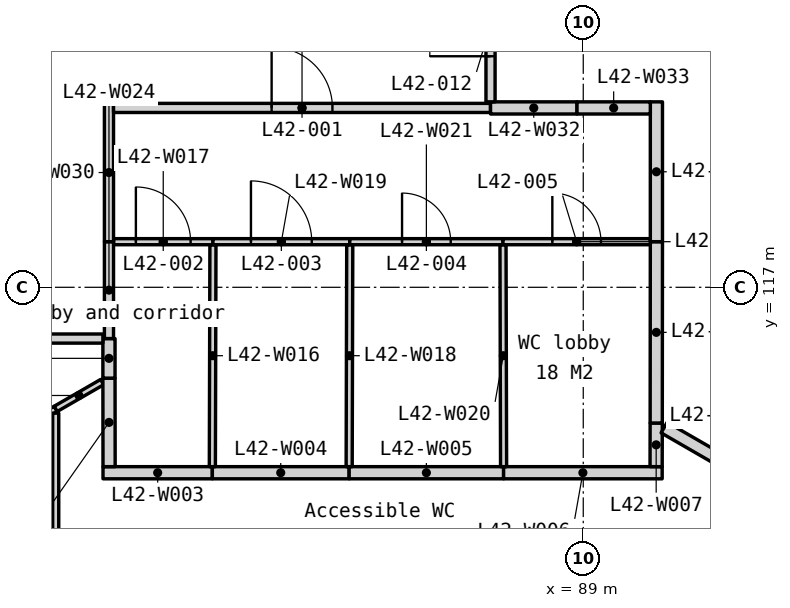
"""IFC4 building model, lengths in metres.
Left out: names, types, materials, properties, quantities, classifications, styles, units other than length and angle.
Written with IfcOpenShell. Run it as: python <this file> out.ifc"""

import sys

from ifc_helpers import new_model, si_unit, direction, frame, frame_2d, origin, place, context, subcontext, project, spatial, polyline, rectangle, outline, extrude, element, fill, save


model = new_model("IFC4")
c1 = context("Model", 3, precision=1e-05, world=origin(), true_north=direction((0.0, 1.0)))
c2 = subcontext(c1, "Body", "Model", "MODEL_VIEW")
j1 = project(units=[si_unit("LENGTHUNIT", "METRE"), si_unit("PLANEANGLEUNIT", "RADIAN")], contexts=[c1])
p1 = place(None, origin())
s1 = spatial("IfcSite", under=j1, at=p1, CompositionType="ELEMENT")
p2 = place(p1, origin())
s2 = spatial("IfcBuilding", under=s1, at=p2, CompositionType="ELEMENT")
p3 = place(p2, frame((0.0, 0.0, 167.6)))
s3 = spatial("IfcBuildingStorey", under=s2, at=p3, CompositionType="ELEMENT", Elevation=167.6)
p4 = place(p3, frame((88.166, 106.564, -0.15), z_axis=(0.0, 0.0, 1.0), x_axis=(0.499995644604, 0.866027918359, 0.0)))
e1 = element("IfcWall", 1, at=p4, inside=s3, PredefinedType="SOLIDWALL", context=c2, shape_type="SweptSolid", body=[
    extrude(outline(polyline([(28.365, 3.9), (28.365, 0.0), (0.0, 0.0), (0.0, 3.9), (28.365, 3.9)])), frame((0.0, 0.225, 0.0), z_axis=(0.0, -1.0, 0.0), x_axis=(1.0, 0.0, 0.0)), (0.0, 0.0, 1.0), 0.45),
])
p5 = place(p4, frame((6.072, 0.0, 0.95)))
e2 = element("IfcOpeningElement", 2, at=p5, cuts=e1, PredefinedType="OPENING", context=c2, shape_type="SweptSolid", body=[
    extrude(rectangle(XDim=1.8, YDim=2.2, at=frame_2d((0.9, 1.1))), frame((0.0, 0.235, 0.0), z_axis=(0.0, -1.0, 0.0), x_axis=(1.0, 0.0, 0.0)), (0.0, 0.0, 1.0), 0.47),
])
p6 = place(p4, frame((8.372, 0.0, 0.95)))
e3 = element("IfcOpeningElement", 3, at=p6, cuts=e1, PredefinedType="OPENING", context=c2, shape_type="SweptSolid", body=[
    extrude(rectangle(XDim=1.8, YDim=2.2, at=frame_2d((0.9, 1.1))), frame((0.0, 0.235, 0.0), z_axis=(0.0, -1.0, 0.0), x_axis=(1.0, 0.0, 0.0)), (0.0, 0.0, 1.0), 0.47),
])
p7 = place(p4, frame((16.193, 0.0, 0.95)))
e4 = element("IfcOpeningElement", 4, at=p7, cuts=e1, PredefinedType="OPENING", context=c2, shape_type="SweptSolid", body=[
    extrude(rectangle(XDim=1.8, YDim=2.2, at=frame_2d((0.9, 1.1))), frame((0.0, 0.235, 0.0), z_axis=(0.0, -1.0, 0.0), x_axis=(1.0, 0.0, 0.0)), (0.0, 0.0, 1.0), 0.47),
])
p8 = place(p4, frame((18.493, 0.0, 0.95)))
e5 = element("IfcOpeningElement", 5, at=p8, cuts=e1, PredefinedType="OPENING", context=c2, shape_type="SweptSolid", body=[
    extrude(rectangle(XDim=1.8, YDim=2.2, at=frame_2d((0.9, 1.1))), frame((0.0, 0.235, 0.0), z_axis=(0.0, -1.0, 0.0), x_axis=(1.0, 0.0, 0.0)), (0.0, 0.0, 1.0), 0.47),
])
p9 = place(p4, frame((26.295, 0.0, 0.95)))
e6 = element("IfcOpeningElement", 6, at=p9, cuts=e1, PredefinedType="OPENING", context=c2, shape_type="SweptSolid", body=[
    extrude(rectangle(XDim=1.2, YDim=2.2, at=frame_2d((0.6, 1.1))), frame((0.0, 0.235, 0.0), z_axis=(0.0, -1.0, 0.0), x_axis=(1.0, 0.0, 0.0)), (0.0, 0.0, 1.0), 0.47),
])
p10 = place(p3, frame((70.499, 109.328, 0.0), z_axis=(0.0, 0.0, 1.0), x_axis=(0.866029704776, 0.49999255039, 0.0)))
e7 = element("IfcWall", 7, at=p10, inside=s3, PredefinedType="PARTITIONING", context=c2, shape_type="SweptSolid", body=[
    extrude(rectangle(XDim=11.345, YDim=0.1, at=frame_2d((5.673, 0.0))), origin(), (0.0, 0.0, 1.0), 3.75),
])
p11 = place(p10, frame((5.223, 0.0, 0.0)))
e8 = element("IfcOpeningElement", 8, at=p11, cuts=e7, PredefinedType="OPENING", context=c2, shape_type="SweptSolid", body=[
    extrude(rectangle(XDim=0.9, YDim=2.1, at=frame_2d((0.45, 1.05))), frame((0.0, 0.06, 0.0), z_axis=(0.0, -1.0, 0.0), x_axis=(1.0, 0.0, 0.0)), (0.0, 0.0, 1.0), 0.12),
])
p12 = place(p3, frame((81.102, 113.95, 0.0), z_axis=(0.0, 0.0, 1.0), x_axis=(1.0, 0.0, 0.0)))
e9 = element("IfcWall", 9, at=p12, inside=s3, PredefinedType="PARTITIONING", context=c2, shape_type="SweptSolid", body=[
    extrude(rectangle(XDim=1.798, YDim=0.2, at=frame_2d((0.899, 0.0))), origin(), (0.0, 0.0, 1.0), 3.75),
])
p13 = place(p3, frame((82.9, 113.95, 0.0), z_axis=(0.0, 0.0, 1.0), x_axis=(1.0, 0.0, 0.0)))
e10 = element("IfcWall", 10, at=p13, inside=s3, PredefinedType="PARTITIONING", context=c2, shape_type="SweptSolid", body=[
    extrude(rectangle(XDim=2.25, YDim=0.2, at=frame_2d((1.125, 0.0))), origin(), (0.0, 0.0, 1.0), 3.75),
])
p14 = place(p3, frame((85.15, 113.95, 0.0), z_axis=(0.0, 0.0, 1.0), x_axis=(1.0, 0.0, 0.0)))
e11 = element("IfcWall", 11, at=p14, inside=s3, PredefinedType="PARTITIONING", context=c2, shape_type="SweptSolid", body=[
    extrude(rectangle(XDim=2.54, YDim=0.2, at=frame_2d((1.27, 0.0))), origin(), (0.0, 0.0, 1.0), 3.75),
])
p15 = place(p3, frame((87.69, 113.95, 0.0), z_axis=(0.0, 0.0, 1.0), x_axis=(1.0, 0.0, 0.0)))
e12 = element("IfcWall", 12, at=p15, inside=s3, PredefinedType="PARTITIONING", context=c2, shape_type="SweptSolid", body=[
    extrude(rectangle(XDim=2.608, YDim=0.2, at=frame_2d((1.304, 0.0))), origin(), (0.0, 0.0, 1.0), 3.75),
])
p16 = place(p3, frame((90.198, 114.05, 0.0), z_axis=(0.0, 0.0, 1.0), x_axis=(0.002380945632, 0.999997165545, 0.0)))
e13 = element("IfcWall", 13, at=p16, inside=s3, PredefinedType="PARTITIONING", context=c2, shape_type="SweptSolid", body=[
    extrude(rectangle(XDim=0.718, YDim=0.2, at=frame_2d((0.359, 0.0))), origin(), (0.0, 0.0, 1.0), 3.75),
])
p17 = place(p3, frame((90.33, 114.693, 0.0), z_axis=(0.0, 0.0, 1.0), x_axis=(0.866009734793, -0.500027138508, 0.0)))
e14 = element("IfcWall", 14, at=p17, inside=s3, PredefinedType="PARTITIONING", context=c2, shape_type="SweptSolid", body=[
    extrude(rectangle(XDim=1.965, YDim=0.2, at=frame_2d((0.983, 0.0))), origin(), (0.0, 0.0, 1.0), 3.75),
])
p18 = place(p3, frame((90.2, 114.768, 0.0), z_axis=(0.0, 0.0, 1.0), x_axis=(0.000982398216, 0.999999517447, 0.0)))
e15 = element("IfcWall", 15, at=p18, inside=s3, PredefinedType="PARTITIONING", context=c2, shape_type="SweptSolid", body=[
    extrude(rectangle(XDim=2.982, YDim=0.2, at=frame_2d((1.491, 0.0))), origin(), (0.0, 0.0, 1.0), 3.75),
])
p19 = place(p3, frame((80.324, 96.404, 0.0), z_axis=(0.0, 0.0, 1.0), x_axis=(0.0, 1.0, 0.0)))
e16 = element("IfcWall", 16, at=p19, inside=s3, PredefinedType="PARTITIONING", context=c2, shape_type="SweptSolid", body=[
    extrude(rectangle(XDim=18.526, YDim=0.1, at=frame_2d((9.263, 0.0))), origin(), (0.0, 0.0, 1.0), 3.75),
])
p20 = place(p19, frame((8.813, 0.0, 0.0)))
e17 = element("IfcOpeningElement", 17, at=p20, cuts=e16, PredefinedType="OPENING", context=c2, shape_type="SweptSolid", body=[
    extrude(rectangle(XDim=0.9, YDim=2.1, at=frame_2d((0.45, 1.05))), frame((0.0, 0.06, 0.0), z_axis=(0.0, -1.0, 0.0), x_axis=(1.0, 0.0, 0.0)), (0.0, 0.0, 1.0), 0.12),
])
p21 = place(p3, frame((80.324, 115.0, 0.0), z_axis=(0.0, 0.0, 1.0), x_axis=(0.866070288904, 0.499922248632, 0.0)))
e18 = element("IfcWall", 18, at=p21, inside=s3, PredefinedType="PARTITIONING", context=c2, shape_type="SweptSolid", body=[
    extrude(rectangle(XDim=0.882, YDim=0.1, at=frame_2d((0.441, 0.0))), origin(), (0.0, 0.0, 1.0), 3.75),
])
p22 = place(p3, frame((81.202, 114.05, 0.0), z_axis=(0.0, 0.0, 1.0), x_axis=(-0.001341605366, 0.999999100047, 0.0)))
e19 = element("IfcWall", 19, at=p22, inside=s3, PredefinedType="PARTITIONING", context=c2, shape_type="SweptSolid", body=[
    extrude(rectangle(XDim=1.456, YDim=0.2, at=frame_2d((0.728, 0.0))), origin(), (0.0, 0.0, 1.0), 3.75),
])
p23 = place(p3, frame((81.2, 115.506, 0.0), z_axis=(0.0, 0.0, 1.0), x_axis=(0.0, 1.0, 0.0)))
e20 = element("IfcWall", 20, at=p23, inside=s3, PredefinedType="PARTITIONING", context=c2, shape_type="SweptSolid", body=[
    extrude(rectangle(XDim=0.651, YDim=0.2, at=frame_2d((0.325, 0.0))), origin(), (0.0, 0.0, 1.0), 3.75),
])
p24 = place(p3, frame((78.875, 116.157, 0.0), z_axis=(0.0, 0.0, 1.0), x_axis=(1.0, 0.0, 0.0)))
e21 = element("IfcWall", 21, at=p24, inside=s3, PredefinedType="PARTITIONING", context=c2, shape_type="SweptSolid", body=[
    extrude(rectangle(XDim=2.225, YDim=0.15, at=frame_2d((1.113, 0.0))), origin(), (0.0, 0.0, 1.0), 3.75),
])
p25 = place(p3, frame((82.9, 114.05, 0.0), z_axis=(0.0, 0.0, 1.0), x_axis=(0.002675575707, 0.999996420641, 0.0)))
e22 = element("IfcWall", 22, at=p25, inside=s3, PredefinedType="PARTITIONING", context=c2, shape_type="SweptSolid", body=[
    extrude(rectangle(XDim=3.65, YDim=0.1, at=frame_2d((1.825, 0.0))), origin(), (0.0, 0.0, 1.0), 3.75),
])
p26 = place(p3, frame((81.275, 117.75, 0.0), z_axis=(0.0, 0.0, 1.0), x_axis=(1.0, 0.0, 0.0)))
e23 = element("IfcWall", 23, at=p26, inside=s3, PredefinedType="PARTITIONING", context=c2, shape_type="SweptSolid", body=[
    extrude(rectangle(XDim=1.635, YDim=0.1, at=frame_2d((0.817, 0.0))), origin(), (0.0, 0.0, 1.0), 3.75),
])
p27 = place(p26, frame((0.367, 0.0, 0.0)))
e24 = element("IfcOpeningElement", 24, at=p27, cuts=e23, PredefinedType="OPENING", context=c2, shape_type="SweptSolid", body=[
    extrude(rectangle(XDim=0.9, YDim=2.1, at=frame_2d((0.45, 1.05))), frame((0.0, 0.06, 0.0), z_axis=(0.0, -1.0, 0.0), x_axis=(1.0, 0.0, 0.0)), (0.0, 0.0, 1.0), 0.12),
])
p28 = place(p3, frame((85.15, 114.05, 0.0), z_axis=(0.0, 0.0, 1.0), x_axis=(0.002675575707, 0.999996420641, 0.0)))
e25 = element("IfcWall", 25, at=p28, inside=s3, PredefinedType="PARTITIONING", context=c2, shape_type="SweptSolid", body=[
    extrude(rectangle(XDim=3.65, YDim=0.1, at=frame_2d((1.825, 0.0))), origin(), (0.0, 0.0, 1.0), 3.75),
])
p29 = place(p3, frame((82.91, 117.75, 0.0), z_axis=(0.0, 0.0, 1.0), x_axis=(1.0, 0.0, 0.0)))
e26 = element("IfcWall", 26, at=p29, inside=s3, PredefinedType="PARTITIONING", context=c2, shape_type="SweptSolid", body=[
    extrude(rectangle(XDim=2.25, YDim=0.1, at=frame_2d((1.125, 0.0))), origin(), (0.0, 0.0, 1.0), 3.75),
])
p30 = place(p29, frame((0.625, 0.0, 0.0)))
e27 = element("IfcOpeningElement", 27, at=p30, cuts=e26, PredefinedType="OPENING", context=c2, shape_type="SweptSolid", body=[
    extrude(rectangle(XDim=1.0, YDim=2.1, at=frame_2d((0.5, 1.05))), frame((0.0, 0.06, 0.0), z_axis=(0.0, -1.0, 0.0), x_axis=(1.0, 0.0, 0.0)), (0.0, 0.0, 1.0), 0.12),
])
p31 = place(p3, frame((87.69, 114.05, 0.0), z_axis=(0.0, 0.0, 1.0), x_axis=(-0.002608686776, 0.999996597371, 0.0)))
e28 = element("IfcWall", 28, at=p31, inside=s3, PredefinedType="PARTITIONING", context=c2, shape_type="SweptSolid", body=[
    extrude(rectangle(XDim=3.65, YDim=0.1, at=frame_2d((1.825, 0.0))), origin(), (0.0, 0.0, 1.0), 3.75),
])
p32 = place(p3, frame((85.16, 117.75, 0.0), z_axis=(0.0, 0.0, 1.0), x_axis=(1.0, 0.0, 0.0)))
e29 = element("IfcWall", 29, at=p32, inside=s3, PredefinedType="PARTITIONING", context=c2, shape_type="SweptSolid", body=[
    extrude(rectangle(XDim=2.52, YDim=0.1, at=frame_2d((1.26, 0.0))), origin(), (0.0, 0.0, 1.0), 3.75),
])
p33 = place(p32, frame((0.86, 0.0, 0.0)))
e30 = element("IfcOpeningElement", 30, at=p33, cuts=e29, PredefinedType="OPENING", context=c2, shape_type="SweptSolid", body=[
    extrude(rectangle(XDim=0.8, YDim=2.1, at=frame_2d((0.4, 1.05))), frame((0.0, 0.06, 0.0), z_axis=(0.0, -1.0, 0.0), x_axis=(1.0, 0.0, 0.0)), (0.0, 0.0, 1.0), 0.12),
])
p34 = place(p3, frame((87.68, 117.75, 0.0), z_axis=(0.0, 0.0, 1.0), x_axis=(1.0, 0.0, 0.0)))
e31 = element("IfcWall", 31, at=p34, inside=s3, PredefinedType="PARTITIONING", context=c2, shape_type="SweptSolid", body=[
    extrude(rectangle(XDim=2.423, YDim=0.1, at=frame_2d((1.211, 0.0))), origin(), (0.0, 0.0, 1.0), 3.75),
])
p35 = place(p34, frame((0.812, 0.0, 0.0)))
e32 = element("IfcOpeningElement", 32, at=p35, cuts=e31, PredefinedType="OPENING", context=c2, shape_type="SweptSolid", body=[
    extrude(rectangle(XDim=0.8, YDim=2.1, at=frame_2d((0.4, 1.05))), frame((0.0, 0.06, 0.0), z_axis=(0.0, -1.0, 0.0), x_axis=(1.0, 0.0, 0.0)), (0.0, 0.0, 1.0), 0.12),
])
p36 = place(p3, frame((90.203, 117.75, 0.0), z_axis=(0.0, 0.0, 1.0), x_axis=(0.0, 1.0, 0.0)))
e33 = element("IfcWall", 33, at=p36, inside=s3, PredefinedType="PARTITIONING", context=c2, shape_type="SweptSolid", body=[
    extrude(rectangle(XDim=2.3, YDim=0.2, at=frame_2d((1.15, 0.0))), origin(), (0.0, 0.0, 1.0), 3.75),
])
p37 = place(p3, frame((81.2, 116.157, 0.0), z_axis=(0.0, 0.0, 1.0), x_axis=(0.0, 1.0, 0.0)))
e34 = element("IfcWall", 34, at=p37, inside=s3, PredefinedType="PARTITIONING", context=c2, shape_type="SweptSolid", body=[
    extrude(rectangle(XDim=1.593, YDim=0.15, at=frame_2d((0.797, 0.0))), origin(), (0.0, 0.0, 1.0), 3.75),
])
p38 = place(p3, frame((81.2, 117.75, 0.0), z_axis=(0.0, 0.0, 1.0), x_axis=(0.0, 1.0, 0.0)))
e35 = element("IfcWall", 35, at=p38, inside=s3, PredefinedType="PARTITIONING", context=c2, shape_type="SweptSolid", body=[
    extrude(rectangle(XDim=2.275, YDim=0.15, at=frame_2d((1.137, 0.0))), origin(), (0.0, 0.0, 1.0), 3.75),
])
p39 = place(p3, frame((81.275, 119.95, 0.0), z_axis=(0.0, 0.0, 1.0), x_axis=(1.0, 0.0, 0.0)))
e36 = element("IfcWall", 36, at=p39, inside=s3, PredefinedType="PARTITIONING", context=c2, shape_type="SweptSolid", body=[
    extrude(rectangle(XDim=6.2, YDim=0.15, at=frame_2d((3.1, 0.0))), origin(), (0.0, 0.0, 1.0), 3.75),
])
p40 = place(p39, frame((2.6, 0.0, 0.0)))
e37 = element("IfcOpeningElement", 37, at=p40, cuts=e36, PredefinedType="OPENING", context=c2, shape_type="SweptSolid", body=[
    extrude(rectangle(XDim=1.0, YDim=2.1, at=frame_2d((0.5, 1.05))), frame((0.0, 0.085, 0.0), z_axis=(0.0, -1.0, 0.0), x_axis=(1.0, 0.0, 0.0)), (0.0, 0.0, 1.0), 0.17),
])
p41 = place(p3, frame((87.475, 119.95, 0.0), z_axis=(0.0, 0.0, 1.0), x_axis=(1.0, 0.0, 0.0)))
e38 = element("IfcWall", 38, at=p41, inside=s3, PredefinedType="PARTITIONING", context=c2, shape_type="SweptSolid", body=[
    extrude(rectangle(XDim=1.422, YDim=0.2, at=frame_2d((0.711, 0.0))), origin(), (0.0, 0.0, 1.0), 3.75),
])
p42 = place(p3, frame((88.897, 119.95, 0.0), z_axis=(0.0, 0.0, 1.0), x_axis=(1.0, 0.0, 0.0)))
e39 = element("IfcWall", 39, at=p42, inside=s3, PredefinedType="PARTITIONING", context=c2, shape_type="SweptSolid", body=[
    extrude(rectangle(XDim=1.206, YDim=0.2, at=frame_2d((0.603, 0.0))), origin(), (0.0, 0.0, 1.0), 3.75),
])
p43 = place(p3, frame((87.475, 120.05, 0.0), z_axis=(0.0, 0.0, 1.0), x_axis=(0.0, 1.0, 0.0)))
e40 = element("IfcWall", 40, at=p43, inside=s3, PredefinedType="PARTITIONING", context=c2, shape_type="SweptSolid", body=[
    extrude(rectangle(XDim=2.5, YDim=0.15, at=frame_2d((1.25, 0.0))), origin(), (0.0, 0.0, 1.0), 3.75),
])
p44 = place(p43, frame((0.75, 0.0, 0.0)))
e41 = element("IfcOpeningElement", 41, at=p44, cuts=e40, PredefinedType="OPENING", context=c2, shape_type="SweptSolid", body=[
    extrude(rectangle(XDim=1.0, YDim=2.1, at=frame_2d((0.5, 1.05))), frame((0.0, 0.085, 0.0), z_axis=(0.0, -1.0, 0.0), x_axis=(1.0, 0.0, 0.0)), (0.0, 0.0, 1.0), 0.17),
])
p45 = place(p40, origin())
e42 = element("IfcDoor", 42, at=p45, inside=s3, OperationType="SINGLE_SWING_LEFT", PredefinedType="DOOR", context=c2, shape_type="SweptSolid", body=[
    extrude(rectangle(XDim=1.0, YDim=2.1, at=frame_2d((0.5, 1.05))), frame((0.0, 0.025, 0.0), z_axis=(0.0, -1.0, 0.0), x_axis=(1.0, 0.0, 0.0)), (0.0, 0.0, 1.0), 0.05),
])
fill(e37, e42)
p46 = place(p27, origin())
e43 = element("IfcDoor", 43, at=p46, inside=s3, OperationType="SINGLE_SWING_LEFT", PredefinedType="DOOR", context=c2, shape_type="SweptSolid", body=[
    extrude(rectangle(XDim=0.9, YDim=2.1, at=frame_2d((0.45, 1.05))), frame((0.0, 0.025, 0.0), z_axis=(0.0, -1.0, 0.0), x_axis=(1.0, 0.0, 0.0)), (0.0, 0.0, 1.0), 0.05),
])
fill(e24, e43)
p47 = place(p30, origin())
e44 = element("IfcDoor", 44, at=p47, inside=s3, OperationType="SINGLE_SWING_LEFT", PredefinedType="DOOR", context=c2, shape_type="SweptSolid", body=[
    extrude(rectangle(XDim=1.0, YDim=2.1, at=frame_2d((0.5, 1.05))), frame((0.0, 0.025, 0.0), z_axis=(0.0, -1.0, 0.0), x_axis=(1.0, 0.0, 0.0)), (0.0, 0.0, 1.0), 0.05),
])
fill(e27, e44)
p48 = place(p33, origin())
e45 = element("IfcDoor", 45, at=p48, inside=s3, OperationType="SINGLE_SWING_LEFT", PredefinedType="DOOR", context=c2, shape_type="SweptSolid", body=[
    extrude(rectangle(XDim=0.8, YDim=2.1, at=frame_2d((0.4, 1.05))), frame((0.0, 0.025, 0.0), z_axis=(0.0, -1.0, 0.0), x_axis=(1.0, 0.0, 0.0)), (0.0, 0.0, 1.0), 0.05),
])
fill(e30, e45)
p49 = place(p35, origin())
e46 = element("IfcDoor", 46, at=p49, inside=s3, OperationType="SINGLE_SWING_LEFT", PredefinedType="DOOR", context=c2, shape_type="SweptSolid", body=[
    extrude(rectangle(XDim=0.8, YDim=2.1, at=frame_2d((0.4, 1.05))), frame((0.0, 0.025, 0.0), z_axis=(0.0, -1.0, 0.0), x_axis=(1.0, 0.0, 0.0)), (0.0, 0.0, 1.0), 0.05),
])
fill(e32, e46)
p50 = place(p44, origin())
e47 = element("IfcDoor", 47, at=p50, inside=s3, OperationType="SINGLE_SWING_LEFT", PredefinedType="DOOR", context=c2, shape_type="SweptSolid", body=[
    extrude(rectangle(XDim=1.0, YDim=2.1, at=frame_2d((0.5, 1.05))), frame((0.0, 0.025, 0.0), z_axis=(0.0, -1.0, 0.0), x_axis=(1.0, 0.0, 0.0)), (0.0, 0.0, 1.0), 0.05),
])
fill(e41, e47)
save(model, sys.argv[1])
